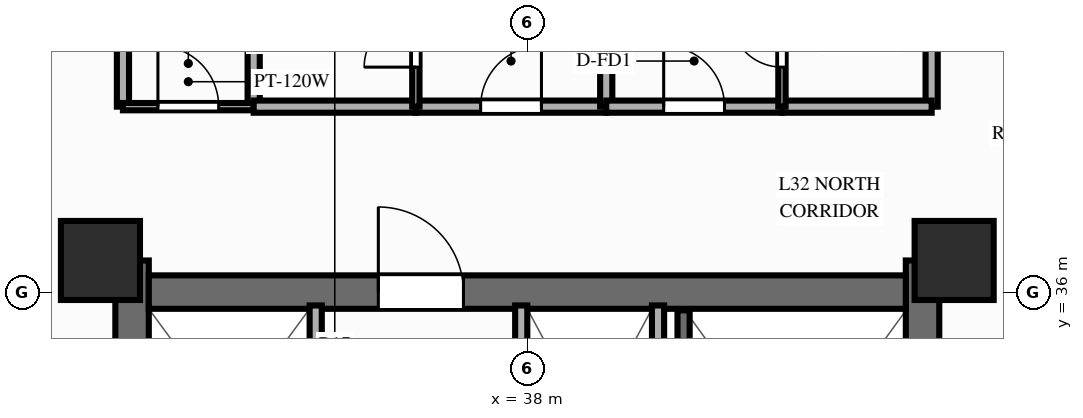
"""IFC4 building model, lengths in metres.
Left out: names, types, materials, properties, quantities, classifications, styles, units other than length and angle.
Written with IfcOpenShell. Run it as: python <this file> out.ifc"""

import sys

from ifc_helpers import new_model, si_unit, direction, frame, frame_2d, origin, origin_2d, place, context, subcontext, project, spatial, rectangle, extrude, source, transform, mapped, element, fill, save


model = new_model("IFC4")
c1 = context("Model", 3, precision=1e-05, world=origin(), true_north=direction((0.0, 1.0)))
c2 = subcontext(c1, "Body", "Model", "MODEL_VIEW")
j1 = project(units=[si_unit("LENGTHUNIT", "METRE"), si_unit("PLANEANGLEUNIT", "RADIAN")], contexts=[c1])
p1 = place(None, origin())
s1 = spatial("IfcSite", under=j1, at=p1, CompositionType="ELEMENT")
p2 = place(p1, origin())
s2 = spatial("IfcBuilding", under=s1, at=p2, CompositionType="ELEMENT")
p3 = place(p2, frame((0.0, 0.0, 101.85)))
s3 = spatial("IfcBuildingStorey", under=s2, at=p3, CompositionType="ELEMENT", Elevation=101.85)
p4 = place(p3, frame((31.5, 17.48, 0.0), z_axis=(0.0, 0.0, 1.0), x_axis=(0.0, 1.0, 0.0)))
e1 = element("IfcWall", 1, at=p4, inside=s3, PredefinedType="SHEAR", context=c2, shape_type="SweptSolid", body=[
    extrude(rectangle(XDim=19.04, YDim=0.55, at=frame_2d((9.52, 0.0))), origin(), (0.0, 0.0, 1.0), 3.0),
])
p5 = place(p4, frame((6.32, 0.0, 0.0)))
e2 = element("IfcOpeningElement", 2, at=p5, cuts=e1, PredefinedType="OPENING", context=c2, shape_type="SweptSolid", body=[
    extrude(rectangle(XDim=1.1, YDim=2.15, at=frame_2d((0.55, 1.075))), frame((0.0, 0.287, 0.0), z_axis=(0.0, -1.0, 0.0), x_axis=(1.0, 0.0, 0.0)), (0.0, 0.0, 1.0), 0.574),
])
p6 = place(p3, frame((44.5, 17.48, 0.0), z_axis=(0.0, 0.0, 1.0), x_axis=(0.0, 1.0, 0.0)))
e3 = element("IfcWall", 3, at=p6, inside=s3, PredefinedType="SHEAR", context=c2, shape_type="SweptSolid", body=[
    extrude(rectangle(XDim=19.04, YDim=0.55, at=frame_2d((9.52, 0.0))), origin(), (0.0, 0.0, 1.0), 3.0),
])
p7 = place(p6, frame((12.67, 0.0, 0.0), z_axis=(0.0, 0.0, 1.0), x_axis=(-1.0, 0.0, 0.0)))
e4 = element("IfcOpeningElement", 4, at=p7, cuts=e3, PredefinedType="OPENING", context=c2, shape_type="SweptSolid", body=[
    extrude(rectangle(XDim=1.1, YDim=2.15, at=frame_2d((0.55, 1.075))), frame((0.0, 0.287, 0.0), z_axis=(0.0, -1.0, 0.0), x_axis=(1.0, 0.0, 0.0)), (0.0, 0.0, 1.0), 0.574),
])
p8 = place(p3, frame((31.775, 36.0, 0.0), z_axis=(0.0, 0.0, 1.0), x_axis=(1.0, 0.0, 0.0)))
e5 = element("IfcWall", 5, at=p8, inside=s3, PredefinedType="SHEAR", context=c2, shape_type="SweptSolid", body=[
    extrude(rectangle(XDim=12.45, YDim=0.55, at=frame_2d((6.225, 0.0))), origin(), (0.0, 0.0, 1.0), 3.0),
])
p9 = place(p8, frame((5.175, 0.0, 0.0), z_axis=(0.0, 0.0, 1.0), x_axis=(-1.0, 0.0, 0.0)))
e6 = element("IfcOpeningElement", 6, at=p9, cuts=e5, PredefinedType="OPENING", context=c2, shape_type="SweptSolid", body=[
    extrude(rectangle(XDim=1.4, YDim=2.15, at=frame_2d((0.7, 1.075))), frame((0.0, 0.287, 0.0), z_axis=(0.0, -1.0, 0.0), x_axis=(1.0, 0.0, 0.0)), (0.0, 0.0, 1.0), 0.574),
])
m1 = source(origin(), c2, "Body", "SweptSolid", [
    extrude(rectangle(XDim=1.3, YDim=1.3, at=origin_2d()), origin(), (0.0, 0.0, 1.0), 3.0),
])
for number, where, z_axis, x_axis in (
    (7, (30.98, 36.52, 0.0), (0.0, 0.0, 1.0), (1.0, 0.0, 0.0)),
    (8, (45.02, 36.52, 0.0), (0.0, 0.0, 1.0), (1.0, 0.0, 0.0)),
):
    element("IfcColumn", number, at=place(p3, frame(where, z_axis=z_axis, x_axis=x_axis)), inside=s3, PredefinedType="COLUMN", context=c2, shape_type="MappedRepresentation", body=[
        mapped(m1, transform((0.0, 0.0, 0.0), scale=1.0)),
    ])
p10 = place(p3, frame((40.15, 31.8, 0.0), z_axis=(0.0, 0.0, 1.0), x_axis=(0.0, 1.0, 0.0)))
e9 = element("IfcWall", 9, at=p10, inside=s3, PredefinedType="PARTITIONING", context=c2, shape_type="SweptSolid", body=[
    extrude(rectangle(XDim=3.98, YDim=0.2, at=frame_2d((1.99, 0.0))), origin(), (0.0, 0.0, 1.0), 2.79),
])
p11 = place(p3, frame((40.57, 28.65, 0.0), z_axis=(0.0, 0.0, 1.0), x_axis=(0.0, 1.0, 0.0)))
e10 = element("IfcWall", 10, at=p11, inside=s3, PredefinedType="SOLIDWALL", context=c2, shape_type="SweptSolid", body=[
    extrude(rectangle(XDim=7.05, YDim=0.2, at=frame_2d((3.525, 0.0))), origin(), (0.0, 0.0, 1.0), 2.79),
])
p12 = place(p3, frame((34.52, 25.44, 0.0), z_axis=(0.0, 0.0, 1.0), x_axis=(0.0, 1.0, 0.0)))
e11 = element("IfcWall", 11, at=p12, inside=s3, PredefinedType="PARTITIONING", context=c2, shape_type="SweptSolid", body=[
    extrude(rectangle(XDim=10.34, YDim=0.2, at=frame_2d((5.17, 0.0))), origin(), (0.0, 0.0, 1.0), 2.79),
])
p13 = place(p12, frame((1.15, 0.0, 0.0)))
e12 = element("IfcOpeningElement", 12, at=p13, cuts=e11, PredefinedType="OPENING", context=c2, shape_type="SweptSolid", body=[
    extrude(rectangle(XDim=0.9, YDim=2.1, at=frame_2d((0.45, 1.05))), frame((0.0, 0.112, 0.0), z_axis=(0.0, -1.0, 0.0), x_axis=(1.0, 0.0, 0.0)), (0.0, 0.0, 1.0), 0.224),
])
p14 = place(p12, frame((4.35, 0.0, 0.0)))
e13 = element("IfcOpeningElement", 13, at=p14, cuts=e11, PredefinedType="OPENING", context=c2, shape_type="SweptSolid", body=[
    extrude(rectangle(XDim=0.9, YDim=2.1, at=frame_2d((0.45, 1.05))), frame((0.0, 0.112, 0.0), z_axis=(0.0, -1.0, 0.0), x_axis=(1.0, 0.0, 0.0)), (0.0, 0.0, 1.0), 0.224),
])
p15 = place(p3, frame((37.9, 25.44, 0.0), z_axis=(0.0, 0.0, 1.0), x_axis=(0.0, 1.0, 0.0)))
e14 = element("IfcWall", 14, at=p15, inside=s3, PredefinedType="PARTITIONING", context=c2, shape_type="SweptSolid", body=[
    extrude(rectangle(XDim=10.34, YDim=0.2, at=frame_2d((5.17, 0.0))), origin(), (0.0, 0.0, 1.0), 2.79),
])
p16 = place(p15, frame((0.32, 0.0, 0.0)))
e15 = element("IfcOpeningElement", 15, at=p16, cuts=e14, PredefinedType="OPENING", context=c2, shape_type="SweptSolid", body=[
    extrude(rectangle(XDim=1.0, YDim=2.15, at=frame_2d((0.5, 1.075))), frame((0.0, 0.112, 0.0), z_axis=(0.0, -1.0, 0.0), x_axis=(1.0, 0.0, 0.0)), (0.0, 0.0, 1.0), 0.224),
])
p17 = place(p15, frame((1.71, 0.0, 0.0)))
e16 = element("IfcOpeningElement", 16, at=p17, cuts=e14, PredefinedType="OPENING", context=c2, shape_type="SweptSolid", body=[
    extrude(rectangle(XDim=1.0, YDim=2.15, at=frame_2d((0.5, 1.075))), frame((0.0, 0.112, 0.0), z_axis=(0.0, -1.0, 0.0), x_axis=(1.0, 0.0, 0.0)), (0.0, 0.0, 1.0), 0.224),
])
p18 = place(p15, frame((3.51, 0.0, 0.0)))
e17 = element("IfcOpeningElement", 17, at=p18, cuts=e14, PredefinedType="OPENING", context=c2, shape_type="SweptSolid", body=[
    extrude(rectangle(XDim=1.0, YDim=2.15, at=frame_2d((0.5, 1.075))), frame((0.0, 0.112, 0.0), z_axis=(0.0, -1.0, 0.0), x_axis=(1.0, 0.0, 0.0)), (0.0, 0.0, 1.0), 0.224),
])
p19 = place(p15, frame((5.01, 0.0, 0.0)))
e18 = element("IfcOpeningElement", 18, at=p19, cuts=e14, PredefinedType="OPENING", context=c2, shape_type="SweptSolid", body=[
    extrude(rectangle(XDim=1.0, YDim=2.15, at=frame_2d((0.5, 1.075))), frame((0.0, 0.112, 0.0), z_axis=(0.0, -1.0, 0.0), x_axis=(1.0, 0.0, 0.0)), (0.0, 0.0, 1.0), 0.224),
])
for number, where, z_axis, x_axis in (
    (19, (31.35, 39.05, 0.0), (0.0, 0.0, 1.0), (0.0, 1.0, 0.0)),
    (20, (44.65, 39.05, 0.0), (0.0, 0.0, 1.0), (0.0, 1.0, 0.0)),
):
    element("IfcWall", number, at=place(p3, frame(where, z_axis=z_axis, x_axis=x_axis)), inside=s3, PredefinedType="PARTITIONING", context=c2, shape_type="SweptSolid", body=[
        extrude(rectangle(XDim=11.8, YDim=0.2, at=frame_2d((5.9, 0.0))), origin(), (0.0, 0.0, 1.0), 2.34),
    ])
p20 = place(p3, frame((33.5, 39.05, 0.0), z_axis=(0.0, 0.0, 1.0), x_axis=(0.0, 1.0, 0.0)))
e21 = element("IfcWall", 21, at=p20, inside=s3, PredefinedType="PARTITIONING", context=c2, shape_type="SweptSolid", body=[
    extrude(rectangle(XDim=11.8, YDim=0.2, at=frame_2d((5.9, 0.0))), origin(), (0.0, 0.0, 1.0), 2.79),
])
p21 = place(p3, frame((31.35, 39.05, 0.0), z_axis=(0.0, 0.0, 1.0), x_axis=(1.0, 0.0, 0.0)))
e22 = element("IfcWall", 22, at=p21, inside=s3, PredefinedType="PARTITIONING", context=c2, shape_type="SweptSolid", body=[
    extrude(rectangle(XDim=2.15, YDim=0.12, at=frame_2d((1.075, 0.0))), origin(), (0.0, 0.0, 1.0), 2.79),
])
p22 = place(p21, frame((0.575, 0.0, 0.0)))
e23 = element("IfcOpeningElement", 23, at=p22, cuts=e22, PredefinedType="OPENING", context=c2, shape_type="SweptSolid", body=[
    extrude(rectangle(XDim=1.0, YDim=2.1, at=frame_2d((0.5, 1.05))), frame((0.0, 0.072, 0.0), z_axis=(0.0, -1.0, 0.0), x_axis=(1.0, 0.0, 0.0)), (0.0, 0.0, 1.0), 0.144),
])
p23 = place(p3, frame((33.5, 39.05, 0.0), z_axis=(0.0, 0.0, 1.0), x_axis=(1.0, 0.0, 0.0)))
e24 = element("IfcWall", 24, at=p23, inside=s3, PredefinedType="PARTITIONING", context=c2, shape_type="SweptSolid", body=[
    extrude(rectangle(XDim=2.667, YDim=0.2, at=frame_2d((1.333, 0.0))), origin(), (0.0, 0.0, 1.0), 2.79),
])
p24 = place(p3, frame((36.167, 39.05, 0.0), z_axis=(0.0, 0.0, 1.0), x_axis=(1.0, 0.0, 0.0)))
e25 = element("IfcWall", 25, at=p24, inside=s3, PredefinedType="PARTITIONING", context=c2, shape_type="SweptSolid", body=[
    extrude(rectangle(XDim=3.131, YDim=0.2, at=frame_2d((1.565, 0.0))), origin(), (0.0, 0.0, 1.0), 2.79),
])
p25 = place(p24, frame((1.065, 0.0, 0.0)))
e26 = element("IfcOpeningElement", 26, at=p25, cuts=e25, PredefinedType="OPENING", context=c2, shape_type="SweptSolid", body=[
    extrude(rectangle(XDim=1.0, YDim=2.15, at=frame_2d((0.5, 1.075))), frame((0.0, 0.112, 0.0), z_axis=(0.0, -1.0, 0.0), x_axis=(1.0, 0.0, 0.0)), (0.0, 0.0, 1.0), 0.224),
])
p26 = place(p3, frame((36.167, 39.05, 0.0), z_axis=(0.0, 0.0, 1.0), x_axis=(0.0, 1.0, 0.0)))
e27 = element("IfcWall", 27, at=p26, inside=s3, PredefinedType="PARTITIONING", context=c2, shape_type="SweptSolid", body=[
    extrude(rectangle(XDim=2.15, YDim=0.12, at=frame_2d((1.075, 0.0))), origin(), (0.0, 0.0, 1.0), 2.79),
])
p27 = place(p26, frame((0.65, 0.0, 0.0)))
e28 = element("IfcOpeningElement", 28, at=p27, cuts=e27, PredefinedType="OPENING", context=c2, shape_type="SweptSolid", body=[
    extrude(rectangle(XDim=0.85, YDim=2.05, at=frame_2d((0.425, 1.025))), frame((0.0, 0.072, 0.0), z_axis=(0.0, -1.0, 0.0), x_axis=(1.0, 0.0, 0.0)), (0.0, 0.0, 1.0), 0.144),
])
p28 = place(p3, frame((39.298, 39.05, 0.0), z_axis=(0.0, 0.0, 1.0), x_axis=(0.0, 1.0, 0.0)))
e29 = element("IfcWall", 29, at=p28, inside=s3, PredefinedType="PARTITIONING", context=c2, shape_type="SweptSolid", body=[
    extrude(rectangle(XDim=11.8, YDim=0.2, at=frame_2d((5.9, 0.0))), origin(), (0.0, 0.0, 1.0), 2.79),
])
p29 = place(p3, frame((39.298, 39.05, 0.0), z_axis=(0.0, 0.0, 1.0), x_axis=(1.0, 0.0, 0.0)))
e30 = element("IfcWall", 30, at=p29, inside=s3, PredefinedType="PARTITIONING", context=c2, shape_type="SweptSolid", body=[
    extrude(rectangle(XDim=2.89, YDim=0.2, at=frame_2d((1.445, 0.0))), origin(), (0.0, 0.0, 1.0), 2.79),
])
p30 = place(p29, frame((0.945, 0.0, 0.0)))
e31 = element("IfcOpeningElement", 31, at=p30, cuts=e30, PredefinedType="OPENING", context=c2, shape_type="SweptSolid", body=[
    extrude(rectangle(XDim=1.0, YDim=2.15, at=frame_2d((0.5, 1.075))), frame((0.0, 0.112, 0.0), z_axis=(0.0, -1.0, 0.0), x_axis=(1.0, 0.0, 0.0)), (0.0, 0.0, 1.0), 0.224),
])
p31 = place(p3, frame((42.188, 39.05, 0.0), z_axis=(0.0, 0.0, 1.0), x_axis=(1.0, 0.0, 0.0)))
e32 = element("IfcWall", 32, at=p31, inside=s3, PredefinedType="PARTITIONING", context=c2, shape_type="SweptSolid", body=[
    extrude(rectangle(XDim=2.462, YDim=0.2, at=frame_2d((1.231, 0.0))), origin(), (0.0, 0.0, 1.0), 2.79),
])
p32 = place(p3, frame((42.188, 39.05, 0.0), z_axis=(0.0, 0.0, 1.0), x_axis=(0.0, 1.0, 0.0)))
e33 = element("IfcWall", 33, at=p32, inside=s3, PredefinedType="PARTITIONING", context=c2, shape_type="SweptSolid", body=[
    extrude(rectangle(XDim=2.15, YDim=0.12, at=frame_2d((1.075, 0.0))), origin(), (0.0, 0.0, 1.0), 2.79),
])
p33 = place(p32, frame((0.65, 0.0, 0.0)))
e34 = element("IfcOpeningElement", 34, at=p33, cuts=e33, PredefinedType="OPENING", context=c2, shape_type="SweptSolid", body=[
    extrude(rectangle(XDim=0.85, YDim=2.05, at=frame_2d((0.425, 1.025))), frame((0.0, 0.072, 0.0), z_axis=(0.0, -1.0, 0.0), x_axis=(1.0, 0.0, 0.0)), (0.0, 0.0, 1.0), 0.144),
])
m2 = source(origin(), c2, "Body", "SweptSolid", [
    extrude(rectangle(XDim=1.4, YDim=2.15, at=frame_2d((0.7, 1.075))), frame((0.0, 0.025, 0.0), z_axis=(0.0, -1.0, 0.0), x_axis=(1.0, 0.0, 0.0)), (0.0, 0.0, 1.0), 0.05),
])
p34 = place(p9, origin())
e35 = element("IfcDoor", 35, at=p34, inside=s3, OperationType="SINGLE_SWING_RIGHT", PredefinedType="DOOR", context=c2, shape_type="MappedRepresentation", body=[
    mapped(m2, transform((0.0, 0.0, 0.0), scale=1.0)),
])
fill(e6, e35)
m3 = source(origin(), c2, "Body", "SweptSolid", [
    extrude(rectangle(XDim=1.0, YDim=2.1, at=frame_2d((0.5, 1.05))), frame((0.0, 0.025, 0.0), z_axis=(0.0, -1.0, 0.0), x_axis=(1.0, 0.0, 0.0)), (0.0, 0.0, 1.0), 0.05),
])
p35 = place(p22, origin())
e36 = element("IfcDoor", 36, at=p35, inside=s3, OperationType="SINGLE_SWING_LEFT", PredefinedType="DOOR", context=c2, shape_type="MappedRepresentation", body=[
    mapped(m3, transform((0.0, 0.0, 0.0), scale=1.0)),
])
fill(e23, e36)
m4 = source(origin(), c2, "Body", "SweptSolid", [
    extrude(rectangle(XDim=1.0, YDim=2.15, at=frame_2d((0.5, 1.075))), frame((0.0, 0.025, 0.0), z_axis=(0.0, -1.0, 0.0), x_axis=(1.0, 0.0, 0.0)), (0.0, 0.0, 1.0), 0.05),
])
p36 = place(p25, origin())
e37 = element("IfcDoor", 37, at=p36, inside=s3, OperationType="SINGLE_SWING_RIGHT", PredefinedType="DOOR", context=c2, shape_type="MappedRepresentation", body=[
    mapped(m4, transform((0.0, 0.0, 0.0), scale=1.0)),
])
fill(e26, e37)
m5 = source(origin(), c2, "Body", "SweptSolid", [
    extrude(rectangle(XDim=0.85, YDim=2.05, at=frame_2d((0.425, 1.025))), frame((0.0, 0.025, 0.0), z_axis=(0.0, -1.0, 0.0), x_axis=(1.0, 0.0, 0.0)), (0.0, 0.0, 1.0), 0.05),
])
p37 = place(p27, origin())
e38 = element("IfcDoor", 38, at=p37, inside=s3, OperationType="SINGLE_SWING_LEFT", PredefinedType="DOOR", context=c2, shape_type="MappedRepresentation", body=[
    mapped(m5, transform((0.0, 0.0, 0.0), scale=1.0)),
])
fill(e28, e38)
p38 = place(p30, origin())
e39 = element("IfcDoor", 39, at=p38, inside=s3, OperationType="SINGLE_SWING_LEFT", PredefinedType="DOOR", context=c2, shape_type="MappedRepresentation", body=[
    mapped(m4, transform((0.0, 0.0, 0.0), scale=1.0)),
])
fill(e31, e39)
p39 = place(p33, origin())
e40 = element("IfcDoor", 40, at=p39, inside=s3, OperationType="SINGLE_SWING_RIGHT", PredefinedType="DOOR", context=c2, shape_type="MappedRepresentation", body=[
    mapped(m5, transform((0.0, 0.0, 0.0), scale=1.0)),
])
fill(e34, e40)
save(model, sys.argv[1])
